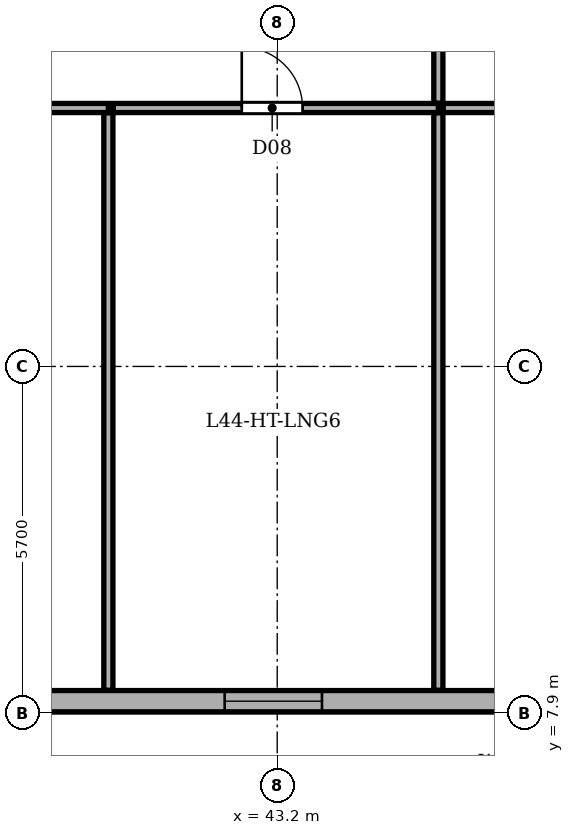
"""IFC4 building model, lengths in metres.
Left out: names, types, materials, properties, quantities, classifications, styles, units other than length and angle.
Written with IfcOpenShell. Run it as: python <this file> out.ifc"""

import sys

from ifc_helpers import new_model, si_unit, direction, frame, frame_2d, origin, place, context, subcontext, project, spatial, rectangle, extrude, element, fill, save


model = new_model("IFC4")
c1 = context("Model", 3, precision=1e-05, world=origin(), true_north=direction((0.0, 1.0)))
c2 = subcontext(c1, "Body", "Model", "MODEL_VIEW")
j1 = project(units=[si_unit("LENGTHUNIT", "METRE"), si_unit("PLANEANGLEUNIT", "RADIAN")], contexts=[c1])
p1 = place(None, origin())
s1 = spatial("IfcSite", under=j1, at=p1, CompositionType="ELEMENT")
p2 = place(p1, origin())
s2 = spatial("IfcBuilding", under=s1, at=p2, CompositionType="ELEMENT")
p3 = place(p2, frame((0.0, 0.0, 172.8)))
s3 = spatial("IfcBuildingStorey", under=s2, at=p3, CompositionType="ELEMENT", Elevation=172.8)
p4 = place(p3, frame((50.7, 8.095, 0.0), z_axis=(0.0, 0.0, 1.0), x_axis=(-1.0, 0.0, 0.0)))
e1 = element("IfcWall", 1, at=p4, inside=s3, PredefinedType="STANDARD", context=c2, shape_type="SweptSolid", body=[
    extrude(rectangle(XDim=35.0, YDim=0.35, at=frame_2d((17.5, 0.0))), origin(), (0.0, 0.0, 1.0), 2.785),
])
p5 = place(p4, frame((26.0, 0.0, 0.0)))
e2 = element("IfcOpeningElement", 2, at=p5, cuts=e1, PredefinedType="OPENING", context=c2, shape_type="SweptSolid", body=[
    extrude(rectangle(XDim=1.0, YDim=2.02, at=frame_2d((0.5, 1.01))), frame((0.0, 0.185, 0.0), z_axis=(0.0, -1.0, 0.0), x_axis=(1.0, 0.0, 0.0)), (0.0, 0.0, 1.0), 0.37),
])
p6 = place(p4, frame((1.763, 0.0, 0.75)))
e3 = element("IfcOpeningElement", 3, at=p6, cuts=e1, PredefinedType="OPENING", context=c2, shape_type="SweptSolid", body=[
    extrude(rectangle(XDim=1.6, YDim=1.75, at=frame_2d((0.8, 0.875))), frame((0.0, 0.185, 0.0), z_axis=(0.0, -1.0, 0.0), x_axis=(1.0, 0.0, 0.0)), (0.0, 0.0, 1.0), 0.37),
])
p7 = place(p4, frame((6.764, 0.0, 0.75)))
e4 = element("IfcOpeningElement", 4, at=p7, cuts=e1, PredefinedType="OPENING", context=c2, shape_type="SweptSolid", body=[
    extrude(rectangle(XDim=1.6, YDim=1.75, at=frame_2d((0.8, 0.875))), frame((0.0, 0.185, 0.0), z_axis=(0.0, -1.0, 0.0), x_axis=(1.0, 0.0, 0.0)), (0.0, 0.0, 1.0), 0.37),
])
p8 = place(p4, frame((12.001, 0.0, 0.75)))
e5 = element("IfcOpeningElement", 5, at=p8, cuts=e1, PredefinedType="OPENING", context=c2, shape_type="SweptSolid", body=[
    extrude(rectangle(XDim=1.6, YDim=1.75, at=frame_2d((0.8, 0.875))), frame((0.0, 0.185, 0.0), z_axis=(0.0, -1.0, 0.0), x_axis=(1.0, 0.0, 0.0)), (0.0, 0.0, 1.0), 0.37),
])
p9 = place(p4, frame((17.467, 0.0, 0.75)))
e6 = element("IfcOpeningElement", 6, at=p9, cuts=e1, PredefinedType="OPENING", context=c2, shape_type="SweptSolid", body=[
    extrude(rectangle(XDim=1.6, YDim=1.75, at=frame_2d((0.8, 0.875))), frame((0.0, 0.185, 0.0), z_axis=(0.0, -1.0, 0.0), x_axis=(1.0, 0.0, 0.0)), (0.0, 0.0, 1.0), 0.37),
])
p10 = place(p4, frame((31.801, 0.0, 0.75)))
e7 = element("IfcOpeningElement", 7, at=p10, cuts=e1, PredefinedType="OPENING", context=c2, shape_type="SweptSolid", body=[
    extrude(rectangle(XDim=1.6, YDim=1.75, at=frame_2d((0.8, 0.875))), frame((0.0, 0.185, 0.0), z_axis=(0.0, -1.0, 0.0), x_axis=(1.0, 0.0, 0.0)), (0.0, 0.0, 1.0), 0.37),
])
p11 = place(p4, frame((23.914, 0.0, 0.75)))
e8 = element("IfcOpeningElement", 8, at=p11, cuts=e1, PredefinedType="OPENING", context=c2, shape_type="SweptSolid", body=[
    extrude(rectangle(XDim=0.75, YDim=1.45, at=frame_2d((0.375, 0.725))), frame((0.0, 0.185, 0.0), z_axis=(0.0, -1.0, 0.0), x_axis=(1.0, 0.0, 0.0)), (0.0, 0.0, 1.0), 0.37),
])
p12 = place(p3, frame((36.646, 17.85, 0.0), z_axis=(0.0, 0.0, 1.0), x_axis=(1.0, 0.0, 0.0)))
e9 = element("IfcWall", 9, at=p12, inside=s3, PredefinedType="PARTITIONING", context=c2, shape_type="SweptSolid", body=[
    extrude(rectangle(XDim=3.777, YDim=0.15, at=frame_2d((1.889, 0.0))), origin(), (0.0, 0.0, 1.0), 3.2),
])
p13 = place(p12, frame((1.409, 0.0, 0.0)))
e10 = element("IfcOpeningElement", 10, at=p13, cuts=e9, PredefinedType="OPENING", context=c2, shape_type="SweptSolid", body=[
    extrude(rectangle(XDim=0.95, YDim=2.1, at=frame_2d((0.475, 1.05))), frame((0.0, 0.085, 0.0), z_axis=(0.0, -1.0, 0.0), x_axis=(1.0, 0.0, 0.0)), (0.0, 0.0, 1.0), 0.17),
])
p14 = place(p3, frame((40.423, 8.275, 0.0), z_axis=(0.0, 0.0, 1.0), x_axis=(0.0, 1.0, 0.0)))
e11 = element("IfcWall", 11, at=p14, inside=s3, PredefinedType="PARTITIONING", context=c2, shape_type="SweptSolid", body=[
    extrude(rectangle(XDim=9.495, YDim=0.15, at=frame_2d((4.748, 0.0))), origin(), (0.0, 0.0, 1.0), 3.2),
])
p15 = place(p3, frame((40.503, 17.85, 0.0), z_axis=(0.0, 0.0, 1.0), x_axis=(1.0, 0.0, 0.0)))
e12 = element("IfcWall", 12, at=p15, inside=s3, PredefinedType="PARTITIONING", context=c2, shape_type="SweptSolid", body=[
    extrude(rectangle(XDim=5.347, YDim=0.15, at=frame_2d((2.674, 0.0))), origin(), (0.0, 0.0, 1.0), 3.2),
])
p16 = place(p15, frame((2.114, 0.0, 0.0)))
e13 = element("IfcOpeningElement", 13, at=p16, cuts=e12, PredefinedType="OPENING", context=c2, shape_type="SweptSolid", body=[
    extrude(rectangle(XDim=1.0, YDim=2.1, at=frame_2d((0.5, 1.05))), frame((0.0, 0.085, 0.0), z_axis=(0.0, -1.0, 0.0), x_axis=(1.0, 0.0, 0.0)), (0.0, 0.0, 1.0), 0.17),
])
p17 = place(p3, frame((45.85, 8.275, 0.0), z_axis=(0.0, 0.0, 1.0), x_axis=(0.0, 1.0, 0.0)))
e14 = element("IfcWall", 14, at=p17, inside=s3, PredefinedType="PARTITIONING", context=c2, shape_type="SweptSolid", body=[
    extrude(rectangle(XDim=9.495, YDim=0.15, at=frame_2d((4.748, 0.0))), origin(), (0.0, 0.0, 1.0), 3.2),
])
p18 = place(p3, frame((45.93, 17.85, 0.0), z_axis=(0.0, 0.0, 1.0), x_axis=(1.0, 0.0, 0.0)))
e15 = element("IfcWall", 15, at=p18, inside=s3, PredefinedType="PARTITIONING", context=c2, shape_type="SweptSolid", body=[
    extrude(rectangle(XDim=9.395, YDim=0.15, at=frame_2d((4.698, 0.0))), origin(), (0.0, 0.0, 1.0), 3.2),
])
p19 = place(p3, frame((45.85, 17.93, 0.0), z_axis=(0.0, 0.0, 1.0), x_axis=(0.0, 1.0, 0.0)))
e16 = element("IfcWall", 16, at=p19, inside=s3, PredefinedType="PARTITIONING", context=c2, shape_type="SweptSolid", body=[
    extrude(rectangle(XDim=6.27, YDim=0.15, at=frame_2d((3.135, 0.0))), origin(), (0.0, 0.0, 1.0), 3.2),
])
p20 = place(p19, frame((2.615, 0.0, 0.0)))
e17 = element("IfcOpeningElement", 17, at=p20, cuts=e16, PredefinedType="OPENING", context=c2, shape_type="SweptSolid", body=[
    extrude(rectangle(XDim=0.95, YDim=2.1, at=frame_2d((0.475, 1.05))), frame((0.0, 0.085, 0.0), z_axis=(0.0, -1.0, 0.0), x_axis=(1.0, 0.0, 0.0)), (0.0, 0.0, 1.0), 0.17),
])
p21 = place(p7, origin())
e18 = element("IfcWindow", 18, at=p21, inside=s3, PartitioningType="SINGLE_PANEL", PredefinedType="WINDOW", context=c2, shape_type="SweptSolid", body=[
    extrude(rectangle(XDim=1.6, YDim=1.75, at=frame_2d((0.8, 0.875))), frame((0.0, -0.01, 0.0), z_axis=(0.0, -1.0, 0.0), x_axis=(1.0, 0.0, 0.0)), (0.0, 0.0, 1.0), 0.06),
])
fill(e4, e18)
p22 = place(p16, origin())
e19 = element("IfcDoor", 19, at=p22, inside=s3, OperationType="SINGLE_SWING_LEFT", PredefinedType="DOOR", context=c2, shape_type="SweptSolid", body=[
    extrude(rectangle(XDim=1.0, YDim=2.1, at=frame_2d((0.5, 1.05))), frame((0.0, 0.025, 0.0), z_axis=(0.0, -1.0, 0.0), x_axis=(1.0, 0.0, 0.0)), (0.0, 0.0, 1.0), 0.05),
])
fill(e13, e19)
save(model, sys.argv[1])
